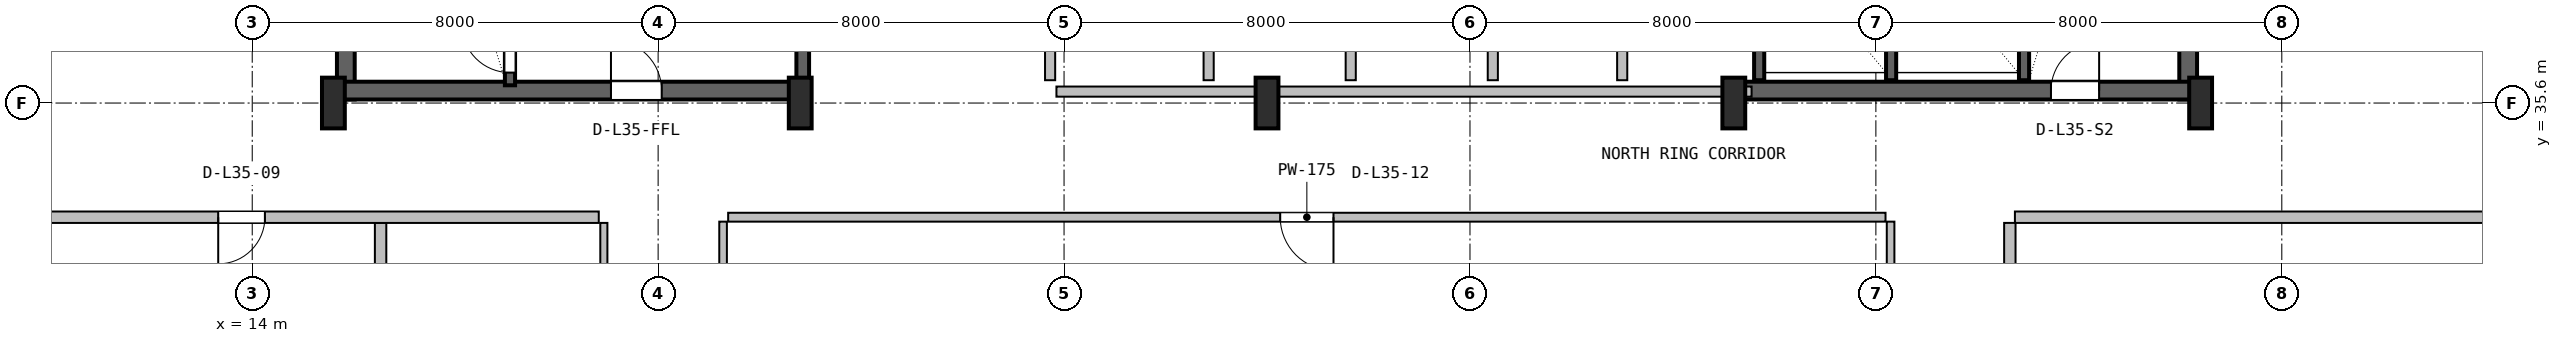
"""IFC4 building model, lengths in metres.
Left out: names, types, materials, properties, quantities, classifications, styles, units other than length and angle.
Written with IfcOpenShell. Run it as: python <this file> out.ifc"""

import sys

from ifc_helpers import new_model, si_unit, direction, frame, frame_2d, origin, origin_2d, place, context, subcontext, project, spatial, rectangle, i_section, extrude, source, transform, mapped, element, fill, save


model = new_model("IFC4")
c1 = context("Model", 3, precision=1e-05, world=origin(), true_north=direction((0.0, 1.0)))
c2 = subcontext(c1, "Body", "Model", "MODEL_VIEW")
j1 = project(units=[si_unit("LENGTHUNIT", "METRE"), si_unit("PLANEANGLEUNIT", "RADIAN")], contexts=[c1])
p1 = place(None, origin())
s1 = spatial("IfcSite", under=j1, at=p1, CompositionType="ELEMENT")
p2 = place(p1, origin())
s2 = spatial("IfcBuilding", under=s1, at=p2, CompositionType="ELEMENT")
p3 = place(p2, frame((0.0, 0.0, 145.8)))
s3 = spatial("IfcBuildingStorey", under=s2, at=p3, CompositionType="ELEMENT", Elevation=145.8)
for number, where, z_axis, x_axis in (
    (1, (15.845, 35.67, 0.0), (0.0, 0.0, 1.0), (0.0, 1.0, 0.0)),
    (2, (52.155, 35.67, 0.0), (0.0, 0.0, 1.0), (0.0, 1.0, 0.0)),
):
    element("IfcWall", number, at=place(p3, frame(where, z_axis=z_axis, x_axis=x_axis)), inside=s3, PredefinedType="SHEAR", context=c2, shape_type="SweptSolid", body=[
        extrude(rectangle(XDim=11.13, YDim=0.35, at=frame_2d((5.565, 0.0))), origin(), (0.0, 0.0, 1.0), 3.55),
    ])
p4 = place(p3, frame((15.67, 35.845, 0.0), z_axis=(0.0, 0.0, 1.0), x_axis=(1.0, 0.0, 0.0)))
e3 = element("IfcWall", 3, at=p4, inside=s3, PredefinedType="SHEAR", context=c2, shape_type="SweptSolid", body=[
    extrude(rectangle(XDim=9.13, YDim=0.35, at=frame_2d((4.565, 0.0))), origin(), (0.0, 0.0, 1.0), 3.55),
])
p5 = place(p4, frame((5.4, 0.0, 0.0)))
e4 = element("IfcOpeningElement", 4, at=p5, cuts=e3, PredefinedType="OPENING", context=c2, shape_type="SweptSolid", body=[
    extrude(rectangle(XDim=1.0, YDim=2.1, at=frame_2d((0.5, 1.05))), frame((0.0, 0.185, 0.0), z_axis=(0.0, -1.0, 0.0), x_axis=(1.0, 0.0, 0.0)), (0.0, 0.0, 1.0), 0.37),
])
p6 = place(p3, frame((43.2, 35.845, 0.0), z_axis=(0.0, 0.0, 1.0), x_axis=(1.0, 0.0, 0.0)))
e5 = element("IfcWall", 5, at=p6, inside=s3, PredefinedType="SHEAR", context=c2, shape_type="SweptSolid", body=[
    extrude(rectangle(XDim=9.13, YDim=0.35, at=frame_2d((4.565, 0.0))), origin(), (0.0, 0.0, 1.0), 3.55),
])
p7 = place(p6, frame((6.25, 0.0, 0.0)))
e6 = element("IfcOpeningElement", 6, at=p7, cuts=e5, PredefinedType="OPENING", context=c2, shape_type="SweptSolid", body=[
    extrude(rectangle(XDim=0.95, YDim=2.1, at=frame_2d((0.475, 1.05))), frame((0.0, 0.185, 0.0), z_axis=(0.0, -1.0, 0.0), x_axis=(1.0, 0.0, 0.0)), (0.0, 0.0, 1.0), 0.37),
])
m1 = source(origin(), c2, "Body", "SweptSolid", [
    extrude(i_section(OverallWidth=0.45, OverallDepth=1.0, WebThickness=0.016, FlangeThickness=0.03, FilletRadius=0.016, at=origin_2d()), origin(), (0.0, 0.0, 1.0), 3.8),
])
for number, where, z_axis, x_axis in (
    (7, (15.6, 35.6, 0.0), (0.0, 0.0, 1.0), (1.0, 0.0, 0.0)),
    (8, (24.8, 35.6, 0.0), (0.0, 0.0, 1.0), (1.0, 0.0, 0.0)),
    (9, (34.0, 35.6, 0.0), (0.0, 0.0, 1.0), (1.0, 0.0, 0.0)),
    (10, (43.2, 35.6, 0.0), (0.0, 0.0, 1.0), (1.0, 0.0, 0.0)),
    (11, (52.4, 35.6, 0.0), (0.0, 0.0, 1.0), (1.0, 0.0, 0.0)),
):
    element("IfcColumn", number, at=place(p3, frame(where, z_axis=z_axis, x_axis=x_axis)), inside=s3, PredefinedType="COLUMN", context=c2, shape_type="MappedRepresentation", body=[
        mapped(m1, transform((0.0, 0.0, 0.0), x_axis=(1.0, 0.0, 0.0), y_axis=(0.0, 1.0, 0.0), z_axis=(0.0, 0.0, 1.0), scale=1.0)),
    ])
p8 = place(p3, frame((19.08, 35.95, 0.0), z_axis=(0.0, 0.0, 1.0), x_axis=(0.0, 1.0, 0.0)))
e12 = element("IfcWall", 12, at=p8, inside=s3, PredefinedType="SHEAR", context=c2, shape_type="SweptSolid", body=[
    extrude(rectangle(XDim=9.65, YDim=0.2, at=frame_2d((4.825, 0.0))), origin(), (0.0, 0.0, 1.0), 3.55),
])
p9 = place(p8, frame((0.25, 0.0, 0.0)))
e13 = element("IfcOpeningElement", 13, at=p9, cuts=e12, PredefinedType="OPENING", context=c2, shape_type="SweptSolid", body=[
    extrude(rectangle(XDim=0.95, YDim=2.1, at=frame_2d((0.475, 1.05))), frame((0.0, 0.11, 0.0), z_axis=(0.0, -1.0, 0.0), x_axis=(1.0, 0.0, 0.0)), (0.0, 0.0, 1.0), 0.22),
])
p10 = place(p3, frame((24.85, 36.05, 0.0), z_axis=(0.0, 0.0, 1.0), x_axis=(0.0, 1.0, 0.0)))
e14 = element("IfcWall", 14, at=p10, inside=s3, PredefinedType="SHEAR", context=c2, shape_type="SweptSolid", body=[
    extrude(rectangle(XDim=10.45, YDim=0.25, at=frame_2d((5.225, 0.0))), origin(), (0.0, 0.0, 1.0), 3.55),
])
p11 = place(p3, frame((48.92, 36.05, 0.0), z_axis=(0.0, 0.0, 1.0), x_axis=(0.0, 1.0, 0.0)))
e15 = element("IfcWall", 15, at=p11, inside=s3, PredefinedType="SHEAR", context=c2, shape_type="SweptSolid", body=[
    extrude(rectangle(XDim=10.5, YDim=0.2, at=frame_2d((5.25, 0.0))), origin(), (0.0, 0.0, 1.0), 3.55),
])
for number, where, z_axis, x_axis in (
    (16, (43.7, 36.05, 0.0), (0.0, 0.0, 1.0), (0.0, 1.0, 0.0)),
    (17, (46.3, 36.05, 0.0), (0.0, 0.0, 1.0), (0.0, 1.0, 0.0)),
):
    element("IfcWall", number, at=place(p3, frame(where, z_axis=z_axis, x_axis=x_axis)), inside=s3, PredefinedType="SHEAR", context=c2, shape_type="SweptSolid", body=[
        extrude(rectangle(XDim=3.05, YDim=0.2, at=frame_2d((1.525, 0.0))), origin(), (0.0, 0.0, 1.0), 3.55),
    ])
p12 = place(p3, frame((29.85, 35.825, 0.0), z_axis=(0.0, 0.0, 1.0), x_axis=(1.0, 0.0, 0.0)))
e18 = element("IfcWall", 18, at=p12, inside=s3, PredefinedType="SOLIDWALL", context=c2, shape_type="SweptSolid", body=[
    extrude(rectangle(XDim=13.7, YDim=0.2, at=frame_2d((6.85, 0.0))), origin(), (0.0, 0.0, 1.0), 2.575),
])
for number, where, z_axis, x_axis in (
    (19, (32.85, 36.05, 0.0), (0.0, 0.0, 1.0), (0.0, 1.0, 0.0)),
    (20, (29.725, 36.05, 0.0), (0.0, 0.0, 1.0), (0.0, 1.0, 0.0)),
    (21, (35.65, 36.05, 0.0), (0.0, 0.0, 1.0), (0.0, 1.0, 0.0)),
    (22, (38.45, 36.05, 0.0), (0.0, 0.0, 1.0), (0.0, 1.0, 0.0)),
):
    element("IfcWall", number, at=place(p3, frame(where, z_axis=z_axis, x_axis=x_axis)), inside=s3, PredefinedType="PLUMBINGWALL", context=c2, shape_type="SweptSolid", body=[
        extrude(rectangle(XDim=3.1, YDim=0.2, at=frame_2d((1.55, 0.0))), origin(), (0.0, 0.0, 1.0), 3.53),
    ])
p13 = place(p3, frame((41.0, 36.05, 0.0), z_axis=(0.0, 0.0, 1.0), x_axis=(0.0, 1.0, 0.0)))
e23 = element("IfcWall", 23, at=p13, inside=s3, PredefinedType="SOLIDWALL", context=c2, shape_type="SweptSolid", body=[
    extrude(rectangle(XDim=3.1, YDim=0.2, at=frame_2d((1.55, 0.0))), origin(), (0.0, 0.0, 1.0), 3.53),
])
p14 = place(p3, frame((16.53, 22.043, 0.0), z_axis=(0.0, 0.0, 1.0), x_axis=(0.0, 1.0, 0.0)))
e24 = element("IfcWall", 24, at=p14, inside=s3, PredefinedType="PARTITIONING", context=c2, shape_type="SweptSolid", body=[
    extrude(rectangle(XDim=11.195, YDim=0.225, at=frame_2d((5.598, 0.0))), origin(), (0.0, 0.0, 1.0), 3.222),
])
p15 = place(p3, frame((7.18, 33.35, 0.0), z_axis=(0.0, 0.0, 1.0), x_axis=(1.0, 0.0, 0.0)))
e25 = element("IfcWall", 25, at=p15, inside=s3, PredefinedType="PARTITIONING", context=c2, shape_type="SweptSolid", body=[
    extrude(rectangle(XDim=13.65, YDim=0.225, at=frame_2d((6.825, 0.0))), origin(), (0.0, 0.0, 1.0), 3.108),
])
p16 = place(p15, frame((6.15, 0.0, 0.0)))
e26 = element("IfcOpeningElement", 26, at=p16, cuts=e25, PredefinedType="OPENING", context=c2, shape_type="SweptSolid", body=[
    extrude(rectangle(XDim=0.92, YDim=2.08, at=frame_2d((0.46, 1.04))), frame((0.0, 0.123, 0.0), z_axis=(0.0, -1.0, 0.0), x_axis=(1.0, 0.0, 0.0)), (0.0, 0.0, 1.0), 0.245),
])
p17 = place(p3, frame((20.93, 22.043, 0.0), z_axis=(0.0, 0.0, 1.0), x_axis=(0.0, 1.0, 0.0)))
e27 = element("IfcWall", 27, at=p17, inside=s3, PredefinedType="PARTITIONING", context=c2, shape_type="SweptSolid", body=[
    extrude(rectangle(XDim=11.195, YDim=0.14, at=frame_2d((5.598, 0.0))), origin(), (0.0, 0.0, 1.0), 3.222),
])
p18 = place(p17, frame((5.098, 0.0, 0.0)))
e28 = element("IfcOpeningElement", 28, at=p18, cuts=e27, PredefinedType="OPENING", context=c2, shape_type="SweptSolid", body=[
    extrude(rectangle(XDim=1.0, YDim=2.1, at=frame_2d((0.5, 1.05))), frame((0.0, 0.08, 0.0), z_axis=(0.0, -1.0, 0.0), x_axis=(1.0, 0.0, 0.0)), (0.0, 0.0, 1.0), 0.16),
])
for number, where, z_axis, x_axis in (
    (29, (46.29, 24.355, 0.0), (0.0, 0.0, 1.0), (0.0, 1.0, 0.0)),
    (30, (23.28, 24.355, 0.0), (0.0, 0.0, 1.0), (0.0, 1.0, 0.0)),
):
    element("IfcWall", number, at=place(p3, frame(where, z_axis=z_axis, x_axis=x_axis)), inside=s3, PredefinedType="PARTITIONING", context=c2, shape_type="SweptSolid", body=[
        extrude(rectangle(XDim=8.908, YDim=0.15, at=frame_2d((4.454, 0.0))), origin(), (0.0, 0.0, 1.0), 3.222),
    ])
p19 = place(p3, frame((23.38, 33.35, 0.0), z_axis=(0.0, 0.0, 1.0), x_axis=(1.0, 0.0, 0.0)))
e31 = element("IfcWall", 31, at=p19, inside=s3, PredefinedType="PARTITIONING", context=c2, shape_type="SweptSolid", body=[
    extrude(rectangle(XDim=22.81, YDim=0.175, at=frame_2d((11.405, 0.0))), origin(), (0.0, 0.0, 1.0), 2.909),
])
p20 = place(p19, frame((10.88, 0.0, 0.0)))
e32 = element("IfcOpeningElement", 32, at=p20, cuts=e31, PredefinedType="OPENING", context=c2, shape_type="SweptSolid", body=[
    extrude(rectangle(XDim=1.05, YDim=2.1, at=frame_2d((0.525, 1.05))), frame((0.0, 0.098, 0.0), z_axis=(0.0, -1.0, 0.0), x_axis=(1.0, 0.0, 0.0)), (0.0, 0.0, 1.0), 0.195),
])
p21 = place(p3, frame((48.74, 33.35, 0.0), z_axis=(0.0, 0.0, 1.0), x_axis=(1.0, 0.0, 0.0)))
e33 = element("IfcWall", 33, at=p21, inside=s3, PredefinedType="PARTITIONING", context=c2, shape_type="SweptSolid", body=[
    extrude(rectangle(XDim=12.08, YDim=0.225, at=frame_2d((6.04, 0.0))), origin(), (0.0, 0.0, 1.0), 3.108),
])
p22 = place(p3, frame((48.64, 22.043, 0.0), z_axis=(0.0, 0.0, 1.0), x_axis=(0.0, 1.0, 0.0)))
e34 = element("IfcWall", 34, at=p22, inside=s3, PredefinedType="PARTITIONING", context=c2, shape_type="SweptSolid", body=[
    extrude(rectangle(XDim=11.195, YDim=0.225, at=frame_2d((5.598, 0.0))), origin(), (0.0, 0.0, 1.0), 3.222),
])
p23 = place(p22, frame((4.897, 0.0, 0.0)))
e35 = element("IfcOpeningElement", 35, at=p23, cuts=e34, PredefinedType="OPENING", context=c2, shape_type="SweptSolid", body=[
    extrude(rectangle(XDim=1.4, YDim=2.12, at=frame_2d((0.7, 1.06))), frame((0.0, 0.123, 0.0), z_axis=(0.0, -1.0, 0.0), x_axis=(1.0, 0.0, 0.0)), (0.0, 0.0, 1.0), 0.245),
])
m2 = source(origin(), c2, "Body", "SweptSolid", [
    extrude(rectangle(XDim=0.95, YDim=2.1, at=frame_2d((0.475, 1.05))), frame((0.0, 0.025, 0.0), z_axis=(0.0, -1.0, 0.0), x_axis=(1.0, 0.0, 0.0)), (0.0, 0.0, 1.0), 0.05),
])
p24 = place(p9, origin())
e36 = element("IfcDoor", 36, at=p24, inside=s3, OperationType="SINGLE_SWING_RIGHT", PredefinedType="DOOR", context=c2, shape_type="MappedRepresentation", body=[
    mapped(m2, transform((0.0, 0.0, 0.0), x_axis=(1.0, 0.0, 0.0), y_axis=(0.0, 1.0, 0.0), z_axis=(0.0, 0.0, 1.0), scale=1.0)),
])
fill(e13, e36)
m3 = source(origin(), c2, "Body", "SweptSolid", [
    extrude(rectangle(XDim=1.0, YDim=2.1, at=frame_2d((0.5, 1.05))), frame((0.0, 0.025, 0.0), z_axis=(0.0, -1.0, 0.0), x_axis=(1.0, 0.0, 0.0)), (0.0, 0.0, 1.0), 0.05),
])
p25 = place(p5, origin())
e37 = element("IfcDoor", 37, at=p25, inside=s3, OperationType="SINGLE_SWING_LEFT", PredefinedType="DOOR", context=c2, shape_type="MappedRepresentation", body=[
    mapped(m3, transform((0.0, 0.0, 0.0), x_axis=(1.0, 0.0, 0.0), y_axis=(0.0, 1.0, 0.0), z_axis=(0.0, 0.0, 1.0), scale=1.0)),
])
fill(e4, e37)
p26 = place(p7, origin())
e38 = element("IfcDoor", 38, at=p26, inside=s3, OperationType="SINGLE_SWING_RIGHT", PredefinedType="DOOR", context=c2, shape_type="MappedRepresentation", body=[
    mapped(m2, transform((0.0, 0.0, 0.0), x_axis=(1.0, 0.0, 0.0), y_axis=(0.0, 1.0, 0.0), z_axis=(0.0, 0.0, 1.0), scale=1.0)),
])
fill(e6, e38)
m4 = source(origin(), c2, "Body", "SweptSolid", [
    extrude(rectangle(XDim=0.92, YDim=2.08, at=frame_2d((0.46, 1.04))), frame((0.0, 0.025, 0.0), z_axis=(0.0, -1.0, 0.0), x_axis=(1.0, 0.0, 0.0)), (0.0, 0.0, 1.0), 0.05),
])
p27 = place(p16, frame((0.92, 0.0, 0.0), z_axis=(0.0, 0.0, 1.0), x_axis=(-1.0, 0.0, 0.0)))
e39 = element("IfcDoor", 39, at=p27, inside=s3, OperationType="SINGLE_SWING_LEFT", PredefinedType="DOOR", context=c2, shape_type="MappedRepresentation", body=[
    mapped(m4, transform((0.0, 0.0, 0.0), x_axis=(1.0, 0.0, 0.0), y_axis=(0.0, 1.0, 0.0), z_axis=(0.0, 0.0, 1.0), scale=1.0)),
])
fill(e26, e39)
m5 = source(origin(), c2, "Body", "SweptSolid", [
    extrude(rectangle(XDim=1.05, YDim=2.1, at=frame_2d((0.525, 1.05))), frame((0.0, 0.025, 0.0), z_axis=(0.0, -1.0, 0.0), x_axis=(1.0, 0.0, 0.0)), (0.0, 0.0, 1.0), 0.05),
])
p28 = place(p20, frame((1.05, 0.0, 0.0), z_axis=(0.0, 0.0, 1.0), x_axis=(-1.0, 0.0, 0.0)))
e40 = element("IfcDoor", 40, at=p28, inside=s3, OperationType="SINGLE_SWING_RIGHT", PredefinedType="DOOR", context=c2, shape_type="MappedRepresentation", body=[
    mapped(m5, transform((0.0, 0.0, 0.0), x_axis=(1.0, 0.0, 0.0), y_axis=(0.0, 1.0, 0.0), z_axis=(0.0, 0.0, 1.0), scale=1.0)),
])
fill(e32, e40)
save(model, sys.argv[1])
